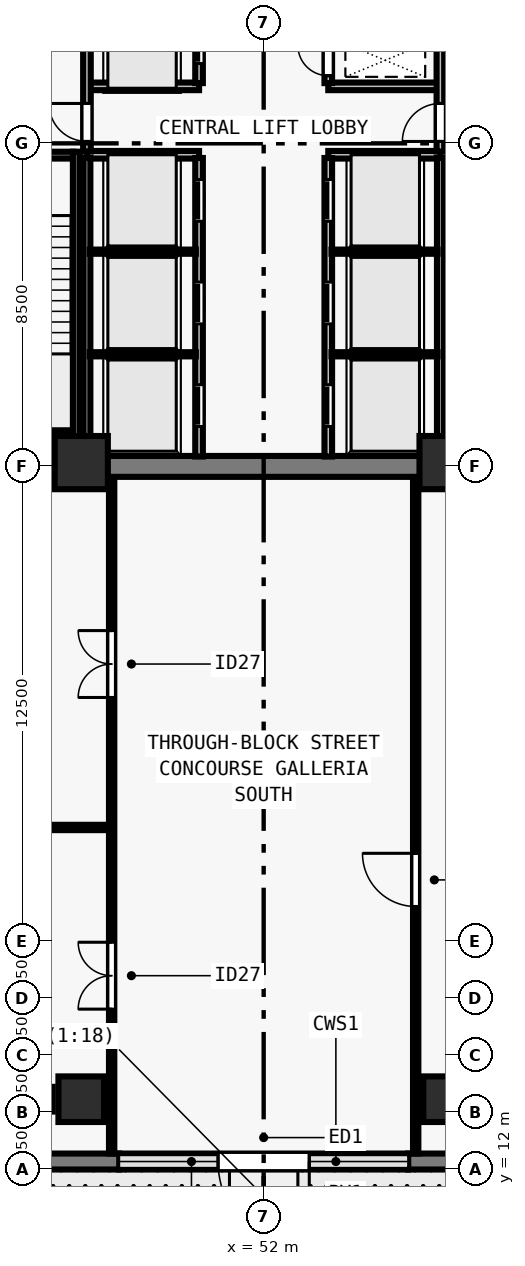
"""IFC4 building model, lengths in metres.
Left out: names, types, materials, properties, quantities, classifications, styles, units other than length and angle.
Written with IfcOpenShell. Run it as: python <this file> out.ifc"""

import sys

from ifc_helpers import new_model, si_unit, direction, frame, frame_2d, origin, origin_2d, place, context, subcontext, project, spatial, rectangle, extrude, element, fill, save


model = new_model("IFC4")
c1 = context("Model", 3, precision=1e-05, world=origin(), true_north=direction((0.0, 1.0)))
c2 = subcontext(c1, "Body", "Model", "MODEL_VIEW")
j1 = project(units=[si_unit("LENGTHUNIT", "METRE"), si_unit("PLANEANGLEUNIT", "RADIAN")], contexts=[c1])
p1 = place(None, origin())
s1 = spatial("IfcSite", under=j1, at=p1, CompositionType="ELEMENT")
p2 = place(p1, origin())
s2 = spatial("IfcBuilding", under=s1, at=p2, CompositionType="ELEMENT")
p3 = place(p2, origin())
s3 = spatial("IfcBuildingStorey", under=s2, at=p3, CompositionType="ELEMENT", Elevation=0.0)
for number, where, z_axis, x_axis in (
    (1, (47.2, 30.6, 0.0), (0.0, 0.0, 1.0), (1.0, 0.0, 0.0)),
    (2, (56.8, 30.6, 0.0), (0.0, 0.0, 1.0), (1.0, 0.0, 0.0)),
):
    element("IfcColumn", number, at=place(p3, frame(where, z_axis=z_axis, x_axis=x_axis)), inside=s3, PredefinedType="COLUMN", context=c2, shape_type="SweptSolid", body=[
        extrude(rectangle(XDim=1.4, YDim=1.4, at=origin_2d()), origin(), (0.0, 0.0, 1.0), 5.0),
    ])
for number, where, z_axis, x_axis in (
    (3, (47.2, 13.85, 0.0), (0.0, 0.0, 1.0), (1.0, 0.0, 0.0)),
    (4, (56.8, 13.85, 0.0), (0.0, 0.0, 1.0), (1.0, 0.0, 0.0)),
):
    element("IfcColumn", number, at=place(p3, frame(where, z_axis=z_axis, x_axis=x_axis)), inside=s3, PredefinedType="COLUMN", context=c2, shape_type="SweptSolid", body=[
        extrude(rectangle(XDim=1.2, YDim=1.2, at=origin_2d()), origin(), (0.0, 0.0, 1.0), 5.0),
    ])
p4 = place(p3, frame((86.0, 12.21, 0.0), z_axis=(0.0, 0.0, 1.0), x_axis=(-1.0, 0.0, 0.0)))
e5 = element("IfcWall", 5, at=p4, inside=s3, PredefinedType="SOLIDWALL", context=c2, shape_type="SweptSolid", body=[
    extrude(rectangle(XDim=30.2, YDim=0.42, at=frame_2d((15.1, 0.0))), origin(), (0.0, 0.0, 1.0), 4.7),
])
p5 = place(p4, frame((6.425, 0.0, 0.0)))
e6 = element("IfcOpeningElement", 6, at=p5, cuts=e5, PredefinedType="OPENING", context=c2, shape_type="SweptSolid", body=[
    extrude(rectangle(XDim=1.15, YDim=2.15, at=frame_2d((0.575, 1.075))), frame((0.0, 0.22, 0.0), z_axis=(0.0, -1.0, 0.0), x_axis=(1.0, 0.0, 0.0)), (0.0, 0.0, 1.0), 0.44),
])
p6 = place(p3, frame((55.8, 12.21, 0.0), z_axis=(0.0, 0.0, 1.0), x_axis=(-1.0, 0.0, 0.0)))
e7 = element("IfcWall", 7, at=p6, inside=s3, PredefinedType="SOLIDWALL", context=c2, shape_type="SweptSolid", body=[
    extrude(rectangle(XDim=7.6, YDim=0.42, at=frame_2d((3.8, 0.0))), origin(), (0.0, 0.0, 1.0), 2.85),
])
p7 = place(p6, frame((2.6, 0.0, 0.0)))
e8 = element("IfcOpeningElement", 8, at=p7, cuts=e7, PredefinedType="OPENING", context=c2, shape_type="SweptSolid", body=[
    extrude(rectangle(XDim=2.4, YDim=2.7, at=frame_2d((1.2, 1.35))), frame((0.0, 0.22, 0.0), z_axis=(0.0, -1.0, 0.0), x_axis=(1.0, 0.0, 0.0)), (0.0, 0.0, 1.0), 0.44),
])
p8 = place(p3, frame((48.2, 12.21, 0.0), z_axis=(0.0, 0.0, 1.0), x_axis=(-1.0, 0.0, 0.0)))
e9 = element("IfcWall", 9, at=p8, inside=s3, PredefinedType="SOLIDWALL", context=c2, shape_type="SweptSolid", body=[
    extrude(rectangle(XDim=30.2, YDim=0.42, at=frame_2d((15.1, 0.0))), origin(), (0.0, 0.0, 1.0), 4.7),
])
p9 = place(p8, frame((23.0, 0.0, 0.0)))
e10 = element("IfcOpeningElement", 10, at=p9, cuts=e9, PredefinedType="OPENING", context=c2, shape_type="SweptSolid", body=[
    extrude(rectangle(XDim=1.15, YDim=2.15, at=frame_2d((0.575, 1.075))), frame((0.0, 0.22, 0.0), z_axis=(0.0, -1.0, 0.0), x_axis=(1.0, 0.0, 0.0)), (0.0, 0.0, 1.0), 0.44),
])
p10 = place(p8, frame((15.25, 0.0, 0.0)))
e11 = element("IfcOpeningElement", 11, at=p10, cuts=e9, PredefinedType="OPENING", context=c2, shape_type="SweptSolid", body=[
    extrude(rectangle(XDim=1.15, YDim=2.15, at=frame_2d((0.575, 1.075))), frame((0.0, 0.22, 0.0), z_axis=(0.0, -1.0, 0.0), x_axis=(1.0, 0.0, 0.0)), (0.0, 0.0, 1.0), 0.44),
])
p11 = place(p3, frame((43.225, 30.5, 0.0), z_axis=(0.0, 0.0, 1.0), x_axis=(1.0, 0.0, 0.0)))
e12 = element("IfcWall", 12, at=p11, inside=s3, PredefinedType="SHEAR", context=c2, shape_type="SweptSolid", body=[
    extrude(rectangle(XDim=17.55, YDim=0.55, at=frame_2d((8.775, 0.0))), origin(), (0.0, 0.0, 1.0), 4.7),
])
for number, where, z_axis, x_axis in (
    (13, (47.35, 38.7, 0.0), (0.0, 0.0, 1.0), (1.0, 0.0, 0.0)),
    (14, (47.35, 40.5, 0.0), (0.0, 0.0, 1.0), (1.0, 0.0, 0.0)),
    (15, (53.7, 38.7, 0.0), (0.0, 0.0, 1.0), (1.0, 0.0, 0.0)),
    (16, (53.7, 40.5, 0.0), (0.0, 0.0, 1.0), (1.0, 0.0, 0.0)),
):
    element("IfcWall", number, at=place(p3, frame(where, z_axis=z_axis, x_axis=x_axis)), inside=s3, PredefinedType="SOLIDWALL", context=c2, shape_type="SweptSolid", body=[
        extrude(rectangle(XDim=2.95, YDim=0.2, at=frame_2d((1.475, 0.0))), origin(), (0.0, 0.0, 1.0), 4.7),
    ])
p12 = place(p3, frame((50.3, 30.76, 0.0), z_axis=(0.0, 0.0, 1.0), x_axis=(0.0, 1.0, 0.0)))
e17 = element("IfcWall", 17, at=p12, inside=s3, PredefinedType="SOLIDWALL", context=c2, shape_type="SweptSolid", body=[
    extrude(rectangle(XDim=7.855, YDim=0.2, at=frame_2d((3.927, 0.0))), origin(), (0.0, 0.0, 1.0), 4.7),
])
p13 = place(p12, frame((0.79, 0.0, 0.0)))
e18 = element("IfcOpeningElement", 18, at=p13, cuts=e17, PredefinedType="OPENING", context=c2, shape_type="SweptSolid", body=[
    extrude(rectangle(XDim=1.1, YDim=2.2, at=frame_2d((0.55, 1.1))), frame((0.0, 0.11, 0.0), z_axis=(0.0, -1.0, 0.0), x_axis=(1.0, 0.0, 0.0)), (0.0, 0.0, 1.0), 0.22),
])
p14 = place(p12, frame((3.49, 0.0, 0.0)))
e19 = element("IfcOpeningElement", 19, at=p14, cuts=e17, PredefinedType="OPENING", context=c2, shape_type="SweptSolid", body=[
    extrude(rectangle(XDim=1.1, YDim=2.2, at=frame_2d((0.55, 1.1))), frame((0.0, 0.11, 0.0), z_axis=(0.0, -1.0, 0.0), x_axis=(1.0, 0.0, 0.0)), (0.0, 0.0, 1.0), 0.22),
])
p15 = place(p12, frame((6.19, 0.0, 0.0)))
e20 = element("IfcOpeningElement", 20, at=p15, cuts=e17, PredefinedType="OPENING", context=c2, shape_type="SweptSolid", body=[
    extrude(rectangle(XDim=1.1, YDim=2.2, at=frame_2d((0.55, 1.1))), frame((0.0, 0.11, 0.0), z_axis=(0.0, -1.0, 0.0), x_axis=(1.0, 0.0, 0.0)), (0.0, 0.0, 1.0), 0.22),
])
p16 = place(p3, frame((53.7, 30.76, 0.0), z_axis=(0.0, 0.0, 1.0), x_axis=(0.0, 1.0, 0.0)))
e21 = element("IfcWall", 21, at=p16, inside=s3, PredefinedType="SOLIDWALL", context=c2, shape_type="SweptSolid", body=[
    extrude(rectangle(XDim=7.855, YDim=0.2, at=frame_2d((3.927, 0.0))), origin(), (0.0, 0.0, 1.0), 4.7),
])
p17 = place(p16, frame((0.79, 0.0, 0.0)))
e22 = element("IfcOpeningElement", 22, at=p17, cuts=e21, PredefinedType="OPENING", context=c2, shape_type="SweptSolid", body=[
    extrude(rectangle(XDim=1.1, YDim=2.2, at=frame_2d((0.55, 1.1))), frame((0.0, 0.11, 0.0), z_axis=(0.0, -1.0, 0.0), x_axis=(1.0, 0.0, 0.0)), (0.0, 0.0, 1.0), 0.22),
])
p18 = place(p16, frame((3.49, 0.0, 0.0)))
e23 = element("IfcOpeningElement", 23, at=p18, cuts=e21, PredefinedType="OPENING", context=c2, shape_type="SweptSolid", body=[
    extrude(rectangle(XDim=1.1, YDim=2.2, at=frame_2d((0.55, 1.1))), frame((0.0, 0.11, 0.0), z_axis=(0.0, -1.0, 0.0), x_axis=(1.0, 0.0, 0.0)), (0.0, 0.0, 1.0), 0.22),
])
p19 = place(p16, frame((6.19, 0.0, 0.0)))
e24 = element("IfcOpeningElement", 24, at=p19, cuts=e21, PredefinedType="OPENING", context=c2, shape_type="SweptSolid", body=[
    extrude(rectangle(XDim=1.1, YDim=2.2, at=frame_2d((0.55, 1.1))), frame((0.0, 0.11, 0.0), z_axis=(0.0, -1.0, 0.0), x_axis=(1.0, 0.0, 0.0)), (0.0, 0.0, 1.0), 0.22),
])
p20 = place(p3, frame((50.3, 40.585, 0.0), z_axis=(0.0, 0.0, 1.0), x_axis=(0.0, 1.0, 0.0)))
e25 = element("IfcWall", 25, at=p20, inside=s3, PredefinedType="SOLIDWALL", context=c2, shape_type="SweptSolid", body=[
    extrude(rectangle(XDim=6.655, YDim=0.2, at=frame_2d((3.328, 0.0))), origin(), (0.0, 0.0, 1.0), 4.7),
])
p21 = place(p20, frame((0.515, 0.0, 0.0)))
e26 = element("IfcOpeningElement", 26, at=p21, cuts=e25, PredefinedType="OPENING", context=c2, shape_type="SweptSolid", body=[
    extrude(rectangle(XDim=1.1, YDim=2.2, at=frame_2d((0.55, 1.1))), frame((0.0, 0.11, 0.0), z_axis=(0.0, -1.0, 0.0), x_axis=(1.0, 0.0, 0.0)), (0.0, 0.0, 1.0), 0.22),
])
p22 = place(p20, frame((3.015, 0.0, 0.0)))
e27 = element("IfcOpeningElement", 27, at=p22, cuts=e25, PredefinedType="OPENING", context=c2, shape_type="SweptSolid", body=[
    extrude(rectangle(XDim=1.1, YDim=2.2, at=frame_2d((0.55, 1.1))), frame((0.0, 0.11, 0.0), z_axis=(0.0, -1.0, 0.0), x_axis=(1.0, 0.0, 0.0)), (0.0, 0.0, 1.0), 0.22),
])
p23 = place(p20, frame((5.065, 0.0, 0.0)))
e28 = element("IfcOpeningElement", 28, at=p23, cuts=e25, PredefinedType="OPENING", context=c2, shape_type="SweptSolid", body=[
    extrude(rectangle(XDim=0.8, YDim=2.08, at=frame_2d((0.4, 1.04))), frame((0.0, 0.11, 0.0), z_axis=(0.0, -1.0, 0.0), x_axis=(1.0, 0.0, 0.0)), (0.0, 0.0, 1.0), 0.22),
])
p24 = place(p3, frame((53.7, 40.585, 0.0), z_axis=(0.0, 0.0, 1.0), x_axis=(0.0, 1.0, 0.0)))
e29 = element("IfcWall", 29, at=p24, inside=s3, PredefinedType="SOLIDWALL", context=c2, shape_type="SweptSolid", body=[
    extrude(rectangle(XDim=6.655, YDim=0.2, at=frame_2d((3.328, 0.0))), origin(), (0.0, 0.0, 1.0), 4.7),
])
p25 = place(p24, frame((0.195, 0.0, 0.0)))
e30 = element("IfcOpeningElement", 30, at=p25, cuts=e29, PredefinedType="OPENING", context=c2, shape_type="SweptSolid", body=[
    extrude(rectangle(XDim=0.8, YDim=2.08, at=frame_2d((0.4, 1.04))), frame((0.0, 0.11, 0.0), z_axis=(0.0, -1.0, 0.0), x_axis=(1.0, 0.0, 0.0)), (0.0, 0.0, 1.0), 0.22),
])
p26 = place(p24, frame((1.865, 0.0, 0.0)))
e31 = element("IfcOpeningElement", 31, at=p26, cuts=e29, PredefinedType="OPENING", context=c2, shape_type="SweptSolid", body=[
    extrude(rectangle(XDim=1.1, YDim=2.2, at=frame_2d((0.55, 1.1))), frame((0.0, 0.11, 0.0), z_axis=(0.0, -1.0, 0.0), x_axis=(1.0, 0.0, 0.0)), (0.0, 0.0, 1.0), 0.22),
])
p27 = place(p24, frame((4.265, 0.0, 0.0)))
e32 = element("IfcOpeningElement", 32, at=p27, cuts=e29, PredefinedType="OPENING", context=c2, shape_type="SweptSolid", body=[
    extrude(rectangle(XDim=0.95, YDim=2.12, at=frame_2d((0.475, 1.06))), frame((0.0, 0.11, 0.0), z_axis=(0.0, -1.0, 0.0), x_axis=(1.0, 0.0, 0.0)), (0.0, 0.0, 1.0), 0.22),
])
p28 = place(p3, frame((47.35, 38.785, 0.0), z_axis=(0.0, 0.0, 1.0), x_axis=(0.0, 1.0, 0.0)))
e33 = element("IfcWall", 33, at=p28, inside=s3, PredefinedType="SOLIDWALL", context=c2, shape_type="SweptSolid", body=[
    extrude(rectangle(XDim=4.865, YDim=0.2, at=frame_2d((2.433, 0.0))), origin(), (0.0, 0.0, 1.0), 4.7),
])
p29 = place(p28, frame((0.265, 0.0, 0.0)))
e34 = element("IfcOpeningElement", 34, at=p29, cuts=e33, PredefinedType="OPENING", context=c2, shape_type="SweptSolid", body=[
    extrude(rectangle(XDim=1.0, YDim=2.15, at=frame_2d((0.5, 1.075))), frame((0.0, 0.11, 0.0), z_axis=(0.0, -1.0, 0.0), x_axis=(1.0, 0.0, 0.0)), (0.0, 0.0, 1.0), 0.22),
])
p30 = place(p3, frame((56.65, 38.785, 0.0), z_axis=(0.0, 0.0, 1.0), x_axis=(0.0, 1.0, 0.0)))
e35 = element("IfcWall", 35, at=p30, inside=s3, PredefinedType="SOLIDWALL", context=c2, shape_type="SweptSolid", body=[
    extrude(rectangle(XDim=4.865, YDim=0.2, at=frame_2d((2.433, 0.0))), origin(), (0.0, 0.0, 1.0), 4.7),
])
p31 = place(p30, frame((0.265, 0.0, 0.0)))
e36 = element("IfcOpeningElement", 36, at=p31, cuts=e35, PredefinedType="OPENING", context=c2, shape_type="SweptSolid", body=[
    extrude(rectangle(XDim=1.0, YDim=2.15, at=frame_2d((0.5, 1.075))), frame((0.0, 0.11, 0.0), z_axis=(0.0, -1.0, 0.0), x_axis=(1.0, 0.0, 0.0)), (0.0, 0.0, 1.0), 0.22),
])
p32 = place(p3, frame((47.35, 30.76, 0.0), z_axis=(0.0, 0.0, 1.0), x_axis=(0.0, 1.0, 0.0)))
e37 = element("IfcWall", 37, at=p32, inside=s3, PredefinedType="SOLIDWALL", context=c2, shape_type="SweptSolid", body=[
    extrude(rectangle(XDim=7.855, YDim=0.18, at=frame_2d((3.927, 0.0))), origin(), (0.0, 0.0, 1.0), 4.7),
])
for number, where, z_axis, x_axis in (
    (38, (47.425, 33.45, 0.0), (0.0, 0.0, 1.0), (1.0, 0.0, 0.0)),
    (39, (47.425, 36.15, 0.0), (0.0, 0.0, 1.0), (1.0, 0.0, 0.0)),
):
    element("IfcWall", number, at=place(p3, frame(where, z_axis=z_axis, x_axis=x_axis)), inside=s3, PredefinedType="PARTITIONING", context=c2, shape_type="SweptSolid", body=[
        extrude(rectangle(XDim=2.79, YDim=0.11, at=frame_2d((1.395, 0.0))), origin(), (0.0, 0.0, 1.0), 4.7),
    ])
p33 = place(p3, frame((56.65, 30.76, 0.0), z_axis=(0.0, 0.0, 1.0), x_axis=(0.0, 1.0, 0.0)))
e40 = element("IfcWall", 40, at=p33, inside=s3, PredefinedType="SOLIDWALL", context=c2, shape_type="SweptSolid", body=[
    extrude(rectangle(XDim=7.855, YDim=0.18, at=frame_2d((3.927, 0.0))), origin(), (0.0, 0.0, 1.0), 4.7),
])
for number, where, z_axis, x_axis in (
    (41, (53.785, 33.45, 0.0), (0.0, 0.0, 1.0), (1.0, 0.0, 0.0)),
    (42, (53.785, 36.15, 0.0), (0.0, 0.0, 1.0), (1.0, 0.0, 0.0)),
):
    element("IfcWall", number, at=place(p3, frame(where, z_axis=z_axis, x_axis=x_axis)), inside=s3, PredefinedType="PARTITIONING", context=c2, shape_type="SweptSolid", body=[
        extrude(rectangle(XDim=2.79, YDim=0.11, at=frame_2d((1.395, 0.0))), origin(), (0.0, 0.0, 1.0), 4.7),
    ])
p34 = place(p3, frame((48.0, 12.42, 0.0), z_axis=(0.0, 0.0, 1.0), x_axis=(0.0, 1.0, 0.0)))
e43 = element("IfcWall", 43, at=p34, inside=s3, PredefinedType="PARTITIONING", context=c2, shape_type="SweptSolid", body=[
    extrude(rectangle(XDim=17.8, YDim=0.14, at=frame_2d((8.9, 0.0))), origin(), (0.0, 0.0, 1.0), 4.7),
])
p35 = place(p34, frame((3.8, 0.0, 0.0)))
e44 = element("IfcOpeningElement", 44, at=p35, cuts=e43, PredefinedType="OPENING", context=c2, shape_type="SweptSolid", body=[
    extrude(rectangle(XDim=1.76, YDim=2.2, at=frame_2d((0.88, 1.1))), frame((0.0, 0.08, 0.0), z_axis=(0.0, -1.0, 0.0), x_axis=(1.0, 0.0, 0.0)), (0.0, 0.0, 1.0), 0.16),
])
p36 = place(p34, frame((12.0, 0.0, 0.0)))
e45 = element("IfcOpeningElement", 45, at=p36, cuts=e43, PredefinedType="OPENING", context=c2, shape_type="SweptSolid", body=[
    extrude(rectangle(XDim=1.76, YDim=2.2, at=frame_2d((0.88, 1.1))), frame((0.0, 0.08, 0.0), z_axis=(0.0, -1.0, 0.0), x_axis=(1.0, 0.0, 0.0)), (0.0, 0.0, 1.0), 0.16),
])
p37 = place(p3, frame((56.0, 12.42, 0.0), z_axis=(0.0, 0.0, 1.0), x_axis=(0.0, 1.0, 0.0)))
e46 = element("IfcWall", 46, at=p37, inside=s3, PredefinedType="PARTITIONING", context=c2, shape_type="SweptSolid", body=[
    extrude(rectangle(XDim=17.8, YDim=0.14, at=frame_2d((8.9, 0.0))), origin(), (0.0, 0.0, 1.0), 4.7),
])
p38 = place(p37, frame((6.5, 0.0, 0.0)))
e47 = element("IfcOpeningElement", 47, at=p38, cuts=e46, PredefinedType="OPENING", context=c2, shape_type="SweptSolid", body=[
    extrude(rectangle(XDim=1.4, YDim=2.2, at=frame_2d((0.7, 1.1))), frame((0.0, 0.08, 0.0), z_axis=(0.0, -1.0, 0.0), x_axis=(1.0, 0.0, 0.0)), (0.0, 0.0, 1.0), 0.16),
])
p39 = place(p3, frame((31.75, 21.0, 0.0), z_axis=(0.0, 0.0, 1.0), x_axis=(1.0, 0.0, 0.0)))
e48 = element("IfcWall", 48, at=p39, inside=s3, PredefinedType="PARTITIONING", context=c2, shape_type="SweptSolid", body=[
    extrude(rectangle(XDim=16.195, YDim=0.14, at=frame_2d((8.098, 0.0))), origin(), (0.0, 0.0, 1.0), 4.218),
])
p40 = place(p3, frame((43.765, 38.69, 0.0), z_axis=(0.0, 0.0, 1.0), x_axis=(1.0, 0.0, 0.0)))
e49 = element("IfcWall", 49, at=p40, inside=s3, PredefinedType="SOLIDWALL", context=c2, shape_type="SweptSolid", body=[
    extrude(rectangle(XDim=3.23, YDim=0.18, at=frame_2d((1.615, 0.0))), origin(), (0.0, 0.0, 1.0), 4.7),
])
p41 = place(p40, frame((1.14, 0.0, 0.0)))
e50 = element("IfcOpeningElement", 50, at=p41, cuts=e49, PredefinedType="OPENING", context=c2, shape_type="SweptSolid", body=[
    extrude(rectangle(XDim=0.95, YDim=2.15, at=frame_2d((0.475, 1.075))), frame((0.0, 0.1, 0.0), z_axis=(0.0, -1.0, 0.0), x_axis=(1.0, 0.0, 0.0)), (0.0, 0.0, 1.0), 0.2),
])
p42 = place(p3, frame((43.765, 31.36, 0.0), z_axis=(0.0, 0.0, 1.0), x_axis=(1.0, 0.0, 0.0)))
e51 = element("IfcWall", 51, at=p42, inside=s3, PredefinedType="SOLIDWALL", context=c2, shape_type="SweptSolid", body=[
    extrude(rectangle(XDim=3.23, YDim=0.18, at=frame_2d((1.615, 0.0))), origin(), (0.0, 0.0, 1.0), 4.7),
])
p43 = place(p3, frame((47.07, 38.78, 0.0), z_axis=(0.0, 0.0, 1.0), x_axis=(0.0, -1.0, 0.0)))
e52 = element("IfcWall", 52, at=p43, inside=s3, PredefinedType="SOLIDWALL", context=c2, shape_type="SweptSolid", body=[
    extrude(rectangle(XDim=8.017, YDim=0.18, at=frame_2d((4.009, 0.0))), origin(), (0.0, 0.0, 1.0), 4.7),
])
p44 = place(p7, origin())
e53 = element("IfcDoor", 53, at=p44, inside=s3, OperationType="SINGLE_SWING_LEFT", PredefinedType="DOOR", context=c2, shape_type="SweptSolid", body=[
    extrude(rectangle(XDim=2.4, YDim=2.7, at=frame_2d((1.2, 1.35))), frame((0.0, 0.025, 0.0), z_axis=(0.0, -1.0, 0.0), x_axis=(1.0, 0.0, 0.0)), (0.0, 0.0, 1.0), 0.05),
])
fill(e8, e53)
p45 = place(p29, origin())
e54 = element("IfcDoor", 54, at=p45, inside=s3, OperationType="SINGLE_SWING_RIGHT", PredefinedType="DOOR", context=c2, shape_type="SweptSolid", body=[
    extrude(rectangle(XDim=1.0, YDim=2.15, at=frame_2d((0.5, 1.075))), frame((0.0, 0.025, 0.0), z_axis=(0.0, -1.0, 0.0), x_axis=(1.0, 0.0, 0.0)), (0.0, 0.0, 1.0), 0.05),
])
fill(e34, e54)
p46 = place(p31, origin())
e55 = element("IfcDoor", 55, at=p46, inside=s3, OperationType="SINGLE_SWING_LEFT", PredefinedType="DOOR", context=c2, shape_type="SweptSolid", body=[
    extrude(rectangle(XDim=1.0, YDim=2.15, at=frame_2d((0.5, 1.075))), frame((0.0, 0.025, 0.0), z_axis=(0.0, -1.0, 0.0), x_axis=(1.0, 0.0, 0.0)), (0.0, 0.0, 1.0), 0.05),
])
fill(e36, e55)
p47 = place(p13, origin())
e56 = element("IfcDoor", 56, at=p47, inside=s3, OperationType="SLIDING_TO_LEFT", PredefinedType="DOOR", context=c2, shape_type="SweptSolid", body=[
    extrude(rectangle(XDim=1.1, YDim=2.2, at=frame_2d((0.55, 1.1))), frame((0.0, 0.025, 0.0), z_axis=(0.0, -1.0, 0.0), x_axis=(1.0, 0.0, 0.0)), (0.0, 0.0, 1.0), 0.05),
])
fill(e18, e56)
p48 = place(p14, origin())
e57 = element("IfcDoor", 57, at=p48, inside=s3, OperationType="SLIDING_TO_LEFT", PredefinedType="DOOR", context=c2, shape_type="SweptSolid", body=[
    extrude(rectangle(XDim=1.1, YDim=2.2, at=frame_2d((0.55, 1.1))), frame((0.0, 0.025, 0.0), z_axis=(0.0, -1.0, 0.0), x_axis=(1.0, 0.0, 0.0)), (0.0, 0.0, 1.0), 0.05),
])
fill(e19, e57)
p49 = place(p15, origin())
e58 = element("IfcDoor", 58, at=p49, inside=s3, OperationType="SLIDING_TO_LEFT", PredefinedType="DOOR", context=c2, shape_type="SweptSolid", body=[
    extrude(rectangle(XDim=1.1, YDim=2.2, at=frame_2d((0.55, 1.1))), frame((0.0, 0.025, 0.0), z_axis=(0.0, -1.0, 0.0), x_axis=(1.0, 0.0, 0.0)), (0.0, 0.0, 1.0), 0.05),
])
fill(e20, e58)
p50 = place(p17, origin())
e59 = element("IfcDoor", 59, at=p50, inside=s3, OperationType="SLIDING_TO_LEFT", PredefinedType="DOOR", context=c2, shape_type="SweptSolid", body=[
    extrude(rectangle(XDim=1.1, YDim=2.2, at=frame_2d((0.55, 1.1))), frame((0.0, 0.025, 0.0), z_axis=(0.0, -1.0, 0.0), x_axis=(1.0, 0.0, 0.0)), (0.0, 0.0, 1.0), 0.05),
])
fill(e22, e59)
p51 = place(p18, origin())
e60 = element("IfcDoor", 60, at=p51, inside=s3, OperationType="SLIDING_TO_LEFT", PredefinedType="DOOR", context=c2, shape_type="SweptSolid", body=[
    extrude(rectangle(XDim=1.1, YDim=2.2, at=frame_2d((0.55, 1.1))), frame((0.0, 0.025, 0.0), z_axis=(0.0, -1.0, 0.0), x_axis=(1.0, 0.0, 0.0)), (0.0, 0.0, 1.0), 0.05),
])
fill(e23, e60)
p52 = place(p19, origin())
e61 = element("IfcDoor", 61, at=p52, inside=s3, OperationType="SLIDING_TO_LEFT", PredefinedType="DOOR", context=c2, shape_type="SweptSolid", body=[
    extrude(rectangle(XDim=1.1, YDim=2.2, at=frame_2d((0.55, 1.1))), frame((0.0, 0.025, 0.0), z_axis=(0.0, -1.0, 0.0), x_axis=(1.0, 0.0, 0.0)), (0.0, 0.0, 1.0), 0.05),
])
fill(e24, e61)
p53 = place(p21, origin())
e62 = element("IfcDoor", 62, at=p53, inside=s3, OperationType="SLIDING_TO_LEFT", PredefinedType="DOOR", context=c2, shape_type="SweptSolid", body=[
    extrude(rectangle(XDim=1.1, YDim=2.2, at=frame_2d((0.55, 1.1))), frame((0.0, 0.025, 0.0), z_axis=(0.0, -1.0, 0.0), x_axis=(1.0, 0.0, 0.0)), (0.0, 0.0, 1.0), 0.05),
])
fill(e26, e62)
p54 = place(p25, origin())
e63 = element("IfcDoor", 63, at=p54, inside=s3, OperationType="SINGLE_SWING_RIGHT", PredefinedType="DOOR", context=c2, shape_type="SweptSolid", body=[
    extrude(rectangle(XDim=0.8, YDim=2.08, at=frame_2d((0.4, 1.04))), frame((0.0, 0.025, 0.0), z_axis=(0.0, -1.0, 0.0), x_axis=(1.0, 0.0, 0.0)), (0.0, 0.0, 1.0), 0.05),
])
fill(e30, e63)
p55 = place(p35, origin())
e64 = element("IfcDoor", 64, at=p55, inside=s3, OperationType="DOUBLE_DOOR_SINGLE_SWING", PredefinedType="DOOR", context=c2, shape_type="SweptSolid", body=[
    extrude(rectangle(XDim=1.76, YDim=2.2, at=frame_2d((0.88, 1.1))), frame((0.0, 0.025, 0.0), z_axis=(0.0, -1.0, 0.0), x_axis=(1.0, 0.0, 0.0)), (0.0, 0.0, 1.0), 0.05),
])
fill(e44, e64)
p56 = place(p36, origin())
e65 = element("IfcDoor", 65, at=p56, inside=s3, OperationType="DOUBLE_DOOR_SINGLE_SWING", PredefinedType="DOOR", context=c2, shape_type="SweptSolid", body=[
    extrude(rectangle(XDim=1.76, YDim=2.2, at=frame_2d((0.88, 1.1))), frame((0.0, 0.025, 0.0), z_axis=(0.0, -1.0, 0.0), x_axis=(1.0, 0.0, 0.0)), (0.0, 0.0, 1.0), 0.05),
])
fill(e45, e65)
p57 = place(p38, origin())
e66 = element("IfcDoor", 66, at=p57, inside=s3, OperationType="SINGLE_SWING_RIGHT", PredefinedType="DOOR", context=c2, shape_type="SweptSolid", body=[
    extrude(rectangle(XDim=1.4, YDim=2.2, at=frame_2d((0.7, 1.1))), frame((0.0, 0.025, 0.0), z_axis=(0.0, -1.0, 0.0), x_axis=(1.0, 0.0, 0.0)), (0.0, 0.0, 1.0), 0.05),
])
fill(e47, e66)
save(model, sys.argv[1])
